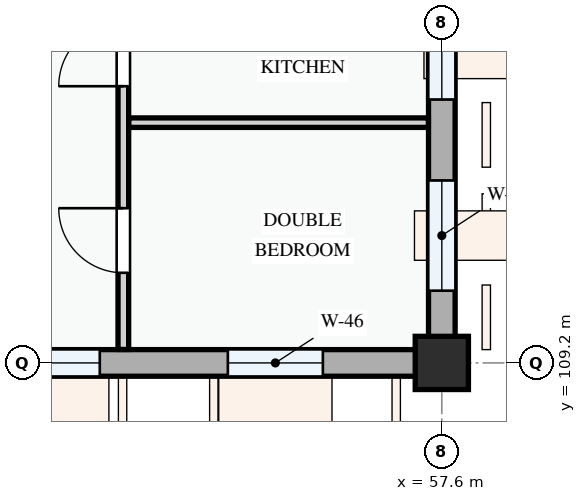
"""IFC4 building model, lengths in metres.
Left out: names, types, materials, properties, quantities, classifications, styles, units other than length and angle.
Written with IfcOpenShell. Run it as: python <this file> out.ifc"""

import sys

from ifc_helpers import new_model, si_unit, direction, frame, frame_2d, origin, origin_2d, place, context, subcontext, project, spatial, rectangle, extrude, element, fill, save


model = new_model("IFC4")
c1 = context("Model", 3, precision=1e-05, world=origin(), true_north=direction((0.0, 1.0)))
c2 = subcontext(c1, "Body", "Model", "MODEL_VIEW")
j1 = project(units=[si_unit("LENGTHUNIT", "METRE"), si_unit("PLANEANGLEUNIT", "RADIAN")], contexts=[c1])
p1 = place(None, origin())
s1 = spatial("IfcSite", under=j1, at=p1, CompositionType="ELEMENT")
p2 = place(p1, origin())
s2 = spatial("IfcBuilding", under=s1, at=p2, CompositionType="ELEMENT")
p3 = place(p2, frame((0.0, 0.0, 14.7)))
s3 = spatial("IfcBuildingStorey", under=s2, at=p3, CompositionType="ELEMENT", Elevation=14.7)
p4 = place(p3, frame((57.6, 109.2, 0.0), z_axis=(0.0, 0.0, 1.0), x_axis=(1.0, 0.0, 0.0)))
e1 = element("IfcColumn", 1, at=p4, inside=s3, PredefinedType="COLUMN", context=c2, shape_type="SweptSolid", body=[
    extrude(rectangle(XDim=0.7, YDim=0.7, at=origin_2d()), origin(), (0.0, 0.0, 1.0), 3.3),
])
p5 = place(p3, frame((51.6, 109.2, 0.0), z_axis=(0.0, 0.0, 1.0), x_axis=(1.0, 0.0, 0.0)))
e2 = element("IfcWall", 2, at=p5, inside=s3, PredefinedType="STANDARD", context=c2, shape_type="SweptSolid", body=[
    extrude(rectangle(XDim=6.0, YDim=0.35, at=frame_2d((3.0, 0.0))), origin(), (0.0, 0.0, 1.0), 2.475),
])
p6 = place(p5, frame((0.5, 0.0, 0.78)))
e3 = element("IfcOpeningElement", 3, at=p6, cuts=e2, PredefinedType="OPENING", context=c2, shape_type="SweptSolid", body=[
    extrude(rectangle(XDim=1.0, YDim=1.25, at=frame_2d((0.5, 0.625))), frame((0.0, 0.185, 0.0), z_axis=(0.0, -1.0, 0.0), x_axis=(1.0, 0.0, 0.0)), (0.0, 0.0, 1.0), 0.37),
])
p7 = place(p5, frame((3.185, 0.0, 0.78)))
e4 = element("IfcOpeningElement", 4, at=p7, cuts=e2, PredefinedType="OPENING", context=c2, shape_type="SweptSolid", body=[
    extrude(rectangle(XDim=1.25, YDim=1.3, at=frame_2d((0.625, 0.65))), frame((0.0, 0.185, 0.0), z_axis=(0.0, -1.0, 0.0), x_axis=(1.0, 0.0, 0.0)), (0.0, 0.0, 1.0), 0.37),
])
p8 = place(p3, frame((57.6, 109.2, 0.0), z_axis=(0.0, 0.0, 1.0), x_axis=(0.0, 1.0, 0.0)))
e5 = element("IfcWall", 5, at=p8, inside=s3, PredefinedType="STANDARD", context=c2, shape_type="SweptSolid", body=[
    extrude(rectangle(XDim=6.0, YDim=0.35, at=frame_2d((3.0, 0.0))), origin(), (0.0, 0.0, 1.0), 2.575),
])
p9 = place(p8, frame((0.95, 0.0, 0.78)))
e6 = element("IfcOpeningElement", 6, at=p9, cuts=e5, PredefinedType="OPENING", context=c2, shape_type="SweptSolid", body=[
    extrude(rectangle(XDim=1.45, YDim=1.6, at=frame_2d((0.725, 0.8))), frame((0.0, 0.185, 0.0), z_axis=(0.0, -1.0, 0.0), x_axis=(1.0, 0.0, 0.0)), (0.0, 0.0, 1.0), 0.37),
])
p10 = place(p8, frame((3.465, 0.0, 0.78)))
e7 = element("IfcOpeningElement", 7, at=p10, cuts=e5, PredefinedType="OPENING", context=c2, shape_type="SweptSolid", body=[
    extrude(rectangle(XDim=1.2, YDim=1.35, at=frame_2d((0.6, 0.675))), frame((0.0, 0.185, 0.0), z_axis=(0.0, -1.0, 0.0), x_axis=(1.0, 0.0, 0.0)), (0.0, 0.0, 1.0), 0.37),
])
p11 = place(p3, frame((53.41, 109.377, 0.0), z_axis=(0.0, 0.0, 1.0), x_axis=(0.0, 1.0, 0.0)))
e8 = element("IfcWall", 8, at=p11, inside=s3, PredefinedType="PARTITIONING", context=c2, shape_type="SweptSolid", body=[
    extrude(rectangle(XDim=6.259, YDim=0.14, at=frame_2d((3.129, 0.0))), origin(), (0.0, 0.0, 1.0), 3.0),
])
p12 = place(p11, frame((1.008, 0.0, 0.0)))
e9 = element("IfcOpeningElement", 9, at=p12, cuts=e8, PredefinedType="OPENING", context=c2, shape_type="SweptSolid", body=[
    extrude(rectangle(XDim=0.85, YDim=2.1, at=frame_2d((0.425, 1.05))), frame((0.0, 0.08, 0.0), z_axis=(0.0, -1.0, 0.0), x_axis=(1.0, 0.0, 0.0)), (0.0, 0.0, 1.0), 0.16),
])
p13 = place(p11, frame((3.463, 0.0, 0.0)))
e10 = element("IfcOpeningElement", 10, at=p13, cuts=e8, PredefinedType="OPENING", context=c2, shape_type="SweptSolid", body=[
    extrude(rectangle(XDim=0.85, YDim=2.1, at=frame_2d((0.425, 1.05))), frame((0.0, 0.08, 0.0), z_axis=(0.0, -1.0, 0.0), x_axis=(1.0, 0.0, 0.0)), (0.0, 0.0, 1.0), 0.16),
])
p14 = place(p11, frame((5.168, 0.0, 0.0)))
e11 = element("IfcOpeningElement", 11, at=p14, cuts=e8, PredefinedType="OPENING", context=c2, shape_type="SweptSolid", body=[
    extrude(rectangle(XDim=0.8, YDim=2.1, at=frame_2d((0.4, 1.05))), frame((0.0, 0.08, 0.0), z_axis=(0.0, -1.0, 0.0), x_axis=(1.0, 0.0, 0.0)), (0.0, 0.0, 1.0), 0.16),
])
p15 = place(p3, frame((53.482, 112.361, 0.0), z_axis=(0.0, 0.0, 1.0), x_axis=(1.0, 0.0, 0.0)))
e12 = element("IfcWall", 12, at=p15, inside=s3, PredefinedType="PARTITIONING", context=c2, shape_type="SweptSolid", body=[
    extrude(rectangle(XDim=3.941, YDim=0.125, at=frame_2d((1.971, 0.0))), origin(), (0.0, 0.0, 1.0), 3.0),
])
p16 = place(p6, origin())
e13 = element("IfcWindow", 13, at=p16, inside=s3, PartitioningType="SINGLE_PANEL", PredefinedType="WINDOW", context=c2, shape_type="SweptSolid", body=[
    extrude(rectangle(XDim=1.0, YDim=1.25, at=frame_2d((0.5, 0.625))), frame((0.0, 0.03, 0.0), z_axis=(0.0, -1.0, 0.0), x_axis=(1.0, 0.0, 0.0)), (0.0, 0.0, 1.0), 0.06),
])
fill(e3, e13)
p17 = place(p7, origin())
e14 = element("IfcWindow", 14, at=p17, inside=s3, PartitioningType="SINGLE_PANEL", PredefinedType="WINDOW", context=c2, shape_type="SweptSolid", body=[
    extrude(rectangle(XDim=1.25, YDim=1.3, at=frame_2d((0.625, 0.65))), frame((0.0, 0.03, 0.0), z_axis=(0.0, -1.0, 0.0), x_axis=(1.0, 0.0, 0.0)), (0.0, 0.0, 1.0), 0.06),
])
fill(e4, e14)
p18 = place(p9, origin())
e15 = element("IfcWindow", 15, at=p18, inside=s3, PartitioningType="SINGLE_PANEL", PredefinedType="WINDOW", context=c2, shape_type="SweptSolid", body=[
    extrude(rectangle(XDim=1.45, YDim=1.6, at=frame_2d((0.725, 0.8))), frame((0.0, 0.03, 0.0), z_axis=(0.0, -1.0, 0.0), x_axis=(1.0, 0.0, 0.0)), (0.0, 0.0, 1.0), 0.06),
])
fill(e6, e15)
p19 = place(p10, origin())
e16 = element("IfcWindow", 16, at=p19, inside=s3, PartitioningType="SINGLE_PANEL", PredefinedType="WINDOW", context=c2, shape_type="SweptSolid", body=[
    extrude(rectangle(XDim=1.2, YDim=1.35, at=frame_2d((0.6, 0.675))), frame((0.0, 0.03, 0.0), z_axis=(0.0, -1.0, 0.0), x_axis=(1.0, 0.0, 0.0)), (0.0, 0.0, 1.0), 0.06),
])
fill(e7, e16)
p20 = place(p12, origin())
e17 = element("IfcDoor", 17, at=p20, inside=s3, OperationType="SINGLE_SWING_RIGHT", PredefinedType="DOOR", context=c2, shape_type="SweptSolid", body=[
    extrude(rectangle(XDim=0.85, YDim=2.1, at=frame_2d((0.425, 1.05))), frame((0.0, 0.025, 0.0), z_axis=(0.0, -1.0, 0.0), x_axis=(1.0, 0.0, 0.0)), (0.0, 0.0, 1.0), 0.05),
])
fill(e9, e17)
p21 = place(p13, origin())
e18 = element("IfcDoor", 18, at=p21, inside=s3, OperationType="SINGLE_SWING_LEFT", PredefinedType="DOOR", context=c2, shape_type="SweptSolid", body=[
    extrude(rectangle(XDim=0.85, YDim=2.1, at=frame_2d((0.425, 1.05))), frame((0.0, 0.025, 0.0), z_axis=(0.0, -1.0, 0.0), x_axis=(1.0, 0.0, 0.0)), (0.0, 0.0, 1.0), 0.05),
])
fill(e10, e18)
save(model, sys.argv[1])
